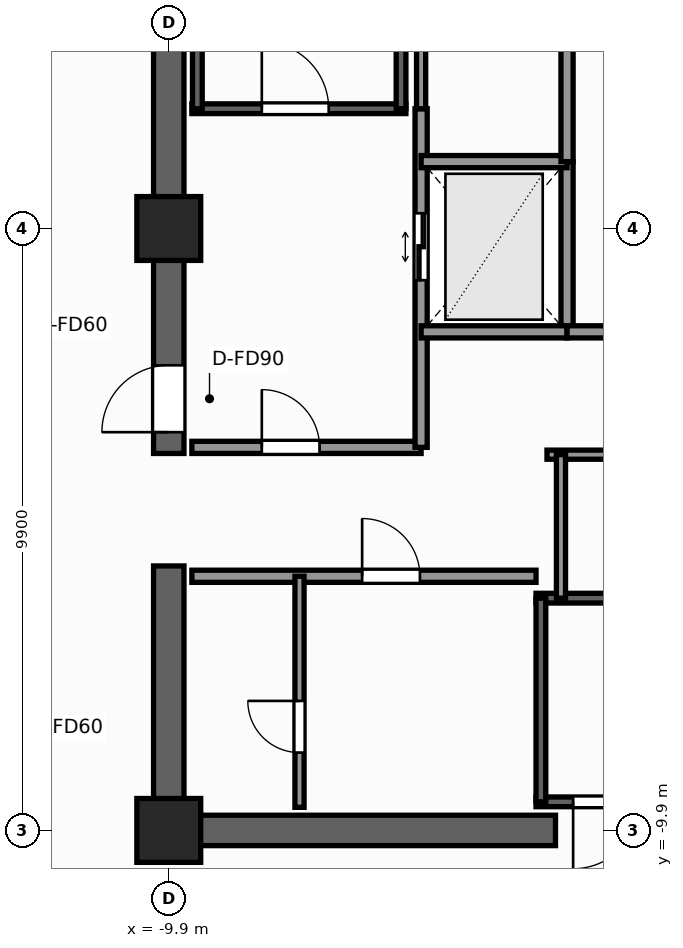
"""IFC4 building model, lengths in metres.
Left out: names, types, materials, properties, quantities, classifications, styles, units other than length and angle.
Written with IfcOpenShell. Run it as: python <this file> out.ifc"""

import sys

from ifc_helpers import new_model, si_unit, direction, frame, frame_2d, origin, origin_2d, place, context, subcontext, project, spatial, rectangle, extrude, element, fill, save


model = new_model("IFC4")
c1 = context("Model", 3, precision=1e-05, world=origin(), true_north=direction((0.0, 1.0)))
c2 = subcontext(c1, "Body", "Model", "MODEL_VIEW")
j1 = project(units=[si_unit("LENGTHUNIT", "METRE"), si_unit("PLANEANGLEUNIT", "RADIAN")], contexts=[c1])
p1 = place(None, origin())
s1 = spatial("IfcSite", under=j1, at=p1, CompositionType="ELEMENT")
p2 = place(p1, origin())
s2 = spatial("IfcBuilding", under=s1, at=p2, CompositionType="ELEMENT")
p3 = place(p2, frame((0.0, 0.0, 196.5)))
s3 = spatial("IfcBuildingStorey", under=s2, at=p3, CompositionType="ELEMENT", Elevation=196.5)
p4 = place(p3, frame((-3.54, -9.9, 0.0), z_axis=(0.0, 0.0, 1.0), x_axis=(-1.0, 0.0, 0.0)))
e1 = element("IfcWall", 1, at=p4, inside=s3, PredefinedType="SHEAR", context=c2, shape_type="SweptSolid", body=[
    extrude(rectangle(XDim=6.61, YDim=0.5, at=frame_2d((3.305, 0.0))), origin(), (0.0, 0.0, 1.0), 3.3),
])
p5 = place(p3, frame((-9.9, -9.65, 0.0), z_axis=(0.0, 0.0, 1.0), x_axis=(0.0, 1.0, 0.0)))
e2 = element("IfcWall", 2, at=p5, inside=s3, PredefinedType="SHEAR", context=c2, shape_type="SweptSolid", body=[
    extrude(rectangle(XDim=4.1, YDim=0.5, at=frame_2d((2.05, 0.0))), origin(), (0.0, 0.0, 1.0), 3.3),
])
p6 = place(p3, frame((-9.9, -3.7, 0.0), z_axis=(0.0, 0.0, 1.0), x_axis=(0.0, 1.0, 0.0)))
e3 = element("IfcWall", 3, at=p6, inside=s3, PredefinedType="SHEAR", context=c2, shape_type="SweptSolid", body=[
    extrude(rectangle(XDim=13.35, YDim=0.5, at=frame_2d((6.675, 0.0))), origin(), (0.0, 0.0, 1.0), 3.3),
])
p7 = place(p6, frame((0.35, 0.0, 0.0)))
e4 = element("IfcOpeningElement", 4, at=p7, cuts=e3, PredefinedType="OPENING", context=c2, shape_type="SweptSolid", body=[
    extrude(rectangle(XDim=1.1, YDim=2.2, at=frame_2d((0.55, 1.1))), frame((0.0, 0.26, 0.0), z_axis=(0.0, -1.0, 0.0), x_axis=(1.0, 0.0, 0.0)), (0.0, 0.0, 1.0), 0.52),
])
for number, where, z_axis, x_axis in (
    (5, (-9.9, -9.9, 0.0), (0.0, 0.0, 1.0), (1.0, 0.0, 0.0)),
    (6, (-9.9, 0.0, 0.0), (0.0, 0.0, 1.0), (1.0, 0.0, 0.0)),
):
    element("IfcColumn", number, at=place(p3, frame(where, z_axis=z_axis, x_axis=x_axis)), inside=s3, PredefinedType="COLUMN", context=c2, shape_type="SweptSolid", body=[
        extrude(rectangle(XDim=1.05, YDim=1.05, at=origin_2d()), origin(), (0.0, 0.0, 1.0), 3.3),
    ])
p8 = place(p3, frame((-9.52, 1.97, 0.0), z_axis=(0.0, 0.0, 1.0), x_axis=(1.0, 0.0, 0.0)))
e7 = element("IfcWall", 7, at=p8, inside=s3, PredefinedType="SHEAR", context=c2, shape_type="SweptSolid", body=[
    extrude(rectangle(XDim=3.52, YDim=0.16, at=frame_2d((1.76, 0.0))), origin(), (0.0, 0.0, 1.0), 3.3),
])
p9 = place(p8, frame((1.15, 0.0, 0.0)))
e8 = element("IfcOpeningElement", 8, at=p9, cuts=e7, PredefinedType="OPENING", context=c2, shape_type="SweptSolid", body=[
    extrude(rectangle(XDim=1.1, YDim=2.2, at=frame_2d((0.55, 1.1))), frame((0.0, 0.09, 0.0), z_axis=(0.0, -1.0, 0.0), x_axis=(1.0, 0.0, 0.0)), (0.0, 0.0, 1.0), 0.18),
])
for number, where, z_axis, x_axis in (
    (9, (-9.43, 1.97, 0.0), (0.0, 0.0, 1.0), (0.0, 1.0, 0.0)),
    (10, (-6.08, 1.97, 0.0), (0.0, 0.0, 1.0), (0.0, 1.0, 0.0)),
):
    element("IfcWall", number, at=place(p3, frame(where, z_axis=z_axis, x_axis=x_axis)), inside=s3, PredefinedType="SHEAR", context=c2, shape_type="SweptSolid", body=[
        extrude(rectangle(XDim=7.56, YDim=0.16, at=frame_2d((3.78, 0.0))), origin(), (0.0, 0.0, 1.0), 3.3),
    ])
p10 = place(p3, frame((3.86, -9.43, 0.0), z_axis=(0.0, 0.0, 1.0), x_axis=(-1.0, 0.0, 0.0)))
e11 = element("IfcWall", 11, at=p10, inside=s3, PredefinedType="SHEAR", context=c2, shape_type="SweptSolid", body=[
    extrude(rectangle(XDim=7.72, YDim=0.16, at=frame_2d((3.86, 0.0))), origin(), (0.0, 0.0, 1.0), 3.3),
])
p11 = place(p10, frame((6.01, 0.0, 0.0)))
e12 = element("IfcOpeningElement", 12, at=p11, cuts=e11, PredefinedType="OPENING", context=c2, shape_type="SweptSolid", body=[
    extrude(rectangle(XDim=1.1, YDim=2.2, at=frame_2d((0.55, 1.1))), frame((0.0, 0.09, 0.0), z_axis=(0.0, -1.0, 0.0), x_axis=(1.0, 0.0, 0.0)), (0.0, 0.0, 1.0), 0.18),
])
p12 = place(p3, frame((-3.86, -6.08, 0.0), z_axis=(0.0, 0.0, 1.0), x_axis=(1.0, 0.0, 0.0)))
e13 = element("IfcWall", 13, at=p12, inside=s3, PredefinedType="SHEAR", context=c2, shape_type="SweptSolid", body=[
    extrude(rectangle(XDim=7.72, YDim=0.16, at=frame_2d((3.86, 0.0))), origin(), (0.0, 0.0, 1.0), 3.3),
])
p13 = place(p3, frame((-3.78, -9.43, 0.0), z_axis=(0.0, 0.0, 1.0), x_axis=(0.0, 1.0, 0.0)))
e14 = element("IfcWall", 14, at=p13, inside=s3, PredefinedType="SHEAR", context=c2, shape_type="SweptSolid", body=[
    extrude(rectangle(XDim=3.35, YDim=0.16, at=frame_2d((1.675, 0.0))), origin(), (0.0, 0.0, 1.0), 3.3),
])
p14 = place(p3, frame((-9.52, -3.6, 0.0), z_axis=(0.0, 0.0, 1.0), x_axis=(1.0, 0.0, 0.0)))
e15 = element("IfcWall", 15, at=p14, inside=s3, PredefinedType="SOLIDWALL", context=c2, shape_type="SweptSolid", body=[
    extrude(rectangle(XDim=3.77, YDim=0.2, at=frame_2d((1.885, 0.0))), origin(), (0.0, 0.0, 1.0), 3.08),
])
p15 = place(p14, frame((1.15, 0.0, 0.0)))
e16 = element("IfcOpeningElement", 16, at=p15, cuts=e15, PredefinedType="OPENING", context=c2, shape_type="SweptSolid", body=[
    extrude(rectangle(XDim=0.95, YDim=2.06, at=frame_2d((0.475, 1.03))), frame((0.0, 0.11, 0.0), z_axis=(0.0, -1.0, 0.0), x_axis=(1.0, 0.0, 0.0)), (0.0, 0.0, 1.0), 0.22),
])
p16 = place(p3, frame((-5.75, -3.6, 0.0), z_axis=(0.0, 0.0, 1.0), x_axis=(0.0, 1.0, 0.0)))
e17 = element("IfcWall", 17, at=p16, inside=s3, PredefinedType="SOLIDWALL", context=c2, shape_type="SweptSolid", body=[
    extrude(rectangle(XDim=5.57, YDim=0.2, at=frame_2d((2.785, 0.0))), origin(), (0.0, 0.0, 1.0), 3.08),
])
p17 = place(p16, frame((2.75, 0.0, 0.0)))
e18 = element("IfcOpeningElement", 18, at=p17, cuts=e17, PredefinedType="OPENING", context=c2, shape_type="SweptSolid", body=[
    extrude(rectangle(XDim=1.1, YDim=2.2, at=frame_2d((0.55, 1.1))), frame((0.0, 0.11, 0.0), z_axis=(0.0, -1.0, 0.0), x_axis=(1.0, 0.0, 0.0)), (0.0, 0.0, 1.0), 0.22),
])
p18 = place(p3, frame((-3.35, -1.7, 0.0), z_axis=(0.0, 0.0, 1.0), x_axis=(0.0, 1.0, 0.0)))
e19 = element("IfcWall", 19, at=p18, inside=s3, PredefinedType="SOLIDWALL", context=c2, shape_type="SweptSolid", body=[
    extrude(rectangle(XDim=2.8, YDim=0.2, at=frame_2d((1.4, 0.0))), origin(), (0.0, 0.0, 1.0), 3.08),
])
for number, where, z_axis, x_axis in (
    (20, (-5.75, -1.7, 0.0), (0.0, 0.0, 1.0), (1.0, 0.0, 0.0)),
    (21, (-5.75, 1.1, 0.0), (0.0, 0.0, 1.0), (1.0, 0.0, 0.0)),
):
    element("IfcWall", number, at=place(p3, frame(where, z_axis=z_axis, x_axis=x_axis)), inside=s3, PredefinedType="SOLIDWALL", context=c2, shape_type="SweptSolid", body=[
        extrude(rectangle(XDim=2.4, YDim=0.2, at=frame_2d((1.2, 0.0))), origin(), (0.0, 0.0, 1.0), 3.08),
    ])
p19 = place(p3, frame((-9.52, -5.72, 0.0), z_axis=(0.0, 0.0, 1.0), x_axis=(1.0, 0.0, 0.0)))
e22 = element("IfcWall", 22, at=p19, inside=s3, PredefinedType="SOLIDWALL", context=c2, shape_type="SweptSolid", body=[
    extrude(rectangle(XDim=5.66, YDim=0.2, at=frame_2d((2.83, 0.0))), origin(), (0.0, 0.0, 1.0), 3.08),
])
p20 = place(p19, frame((2.8, 0.0, 0.0)))
e23 = element("IfcOpeningElement", 23, at=p20, cuts=e22, PredefinedType="OPENING", context=c2, shape_type="SweptSolid", body=[
    extrude(rectangle(XDim=0.95, YDim=2.06, at=frame_2d((0.475, 1.03))), frame((0.0, 0.11, 0.0), z_axis=(0.0, -1.0, 0.0), x_axis=(1.0, 0.0, 0.0)), (0.0, 0.0, 1.0), 0.22),
])
p21 = place(p3, frame((-7.75, -9.52, 0.0), z_axis=(0.0, 0.0, 1.0), x_axis=(0.0, 1.0, 0.0)))
e24 = element("IfcWall", 24, at=p21, inside=s3, PredefinedType="PARTITIONING", context=c2, shape_type="SweptSolid", body=[
    extrude(rectangle(XDim=3.8, YDim=0.15, at=frame_2d((1.9, 0.0))), origin(), (0.0, 0.0, 1.0), 3.08),
])
p22 = place(p21, frame((0.9, 0.0, 0.0)))
e25 = element("IfcOpeningElement", 25, at=p22, cuts=e24, PredefinedType="OPENING", context=c2, shape_type="SweptSolid", body=[
    extrude(rectangle(XDim=0.85, YDim=2.03, at=frame_2d((0.425, 1.015))), frame((0.0, 0.085, 0.0), z_axis=(0.0, -1.0, 0.0), x_axis=(1.0, 0.0, 0.0)), (0.0, 0.0, 1.0), 0.17),
])
p23 = place(p3, frame((-3.35, -1.7, 0.0), z_axis=(0.0, 0.0, 1.0), x_axis=(1.0, 0.0, 0.0)))
e26 = element("IfcWall", 26, at=p23, inside=s3, PredefinedType="SOLIDWALL", context=c2, shape_type="SweptSolid", body=[
    extrude(rectangle(XDim=6.7, YDim=0.2, at=frame_2d((3.35, 0.0))), origin(), (0.0, 0.0, 1.0), 3.08),
])
p24 = place(p3, frame((-3.35, 1.1, 0.0), z_axis=(0.0, 0.0, 1.0), x_axis=(0.0, 1.0, 0.0)))
e27 = element("IfcWall", 27, at=p24, inside=s3, PredefinedType="SOLIDWALL", context=c2, shape_type="SweptSolid", body=[
    extrude(rectangle(XDim=3.2, YDim=0.2, at=frame_2d((1.6, 0.0))), origin(), (0.0, 0.0, 1.0), 3.08),
])
p25 = place(p3, frame((-3.68, -3.72, 0.0), z_axis=(0.0, 0.0, 1.0), x_axis=(1.0, 0.0, 0.0)))
e28 = element("IfcWall", 28, at=p25, inside=s3, PredefinedType="PARTITIONING", context=c2, shape_type="SweptSolid", body=[
    extrude(rectangle(XDim=7.36, YDim=0.15, at=frame_2d((3.68, 0.0))), origin(), (0.0, 0.0, 1.0), 3.08),
])
p26 = place(p3, frame((-3.45, -6.08, 0.0), z_axis=(0.0, 0.0, 1.0), x_axis=(0.0, 1.0, 0.0)))
e29 = element("IfcWall", 29, at=p26, inside=s3, PredefinedType="PARTITIONING", context=c2, shape_type="SweptSolid", body=[
    extrude(rectangle(XDim=2.36, YDim=0.15, at=frame_2d((1.18, 0.0))), origin(), (0.0, 0.0, 1.0), 3.08),
])
p27 = place(p3, frame((-5.75, 1.97, 0.0), z_axis=(0.0, 0.0, 1.0), x_axis=(0.0, 1.0, 0.0)))
e30 = element("IfcWall", 30, at=p27, inside=s3, PredefinedType="PARTITIONING", context=c2, shape_type="SweptSolid", body=[
    extrude(rectangle(XDim=2.33, YDim=0.15, at=frame_2d((1.165, 0.0))), origin(), (0.0, 0.0, 1.0), 3.08),
])
p28 = place(p9, origin())
e31 = element("IfcDoor", 31, at=p28, inside=s3, OperationType="SINGLE_SWING_LEFT", PredefinedType="DOOR", context=c2, shape_type="SweptSolid", body=[
    extrude(rectangle(XDim=1.1, YDim=2.2, at=frame_2d((0.55, 1.1))), frame((0.0, 0.025, 0.0), z_axis=(0.0, -1.0, 0.0), x_axis=(1.0, 0.0, 0.0)), (0.0, 0.0, 1.0), 0.05),
])
fill(e8, e31)
p29 = place(p11, origin())
e32 = element("IfcDoor", 32, at=p29, inside=s3, OperationType="SINGLE_SWING_RIGHT", PredefinedType="DOOR", context=c2, shape_type="SweptSolid", body=[
    extrude(rectangle(XDim=1.1, YDim=2.2, at=frame_2d((0.55, 1.1))), frame((0.0, 0.025, 0.0), z_axis=(0.0, -1.0, 0.0), x_axis=(1.0, 0.0, 0.0)), (0.0, 0.0, 1.0), 0.05),
])
fill(e12, e32)
p30 = place(p7, origin())
e33 = element("IfcDoor", 33, at=p30, inside=s3, OperationType="SINGLE_SWING_LEFT", PredefinedType="DOOR", context=c2, shape_type="SweptSolid", body=[
    extrude(rectangle(XDim=1.1, YDim=2.2, at=frame_2d((0.55, 1.1))), frame((0.0, 0.025, 0.0), z_axis=(0.0, -1.0, 0.0), x_axis=(1.0, 0.0, 0.0)), (0.0, 0.0, 1.0), 0.05),
])
fill(e4, e33)
p31 = place(p17, origin())
e34 = element("IfcDoor", 34, at=p31, inside=s3, OperationType="DOUBLE_DOOR_SLIDING", PredefinedType="DOOR", context=c2, shape_type="SweptSolid", body=[
    extrude(rectangle(XDim=1.1, YDim=2.2, at=frame_2d((0.55, 1.1))), frame((0.0, 0.025, 0.0), z_axis=(0.0, -1.0, 0.0), x_axis=(1.0, 0.0, 0.0)), (0.0, 0.0, 1.0), 0.05),
])
fill(e18, e34)
p32 = place(p20, origin())
e35 = element("IfcDoor", 35, at=p32, inside=s3, OperationType="SINGLE_SWING_LEFT", PredefinedType="DOOR", context=c2, shape_type="SweptSolid", body=[
    extrude(rectangle(XDim=0.95, YDim=2.06, at=frame_2d((0.475, 1.03))), frame((0.0, 0.025, 0.0), z_axis=(0.0, -1.0, 0.0), x_axis=(1.0, 0.0, 0.0)), (0.0, 0.0, 1.0), 0.05),
])
fill(e23, e35)
p33 = place(p22, origin())
e36 = element("IfcDoor", 36, at=p33, inside=s3, OperationType="SINGLE_SWING_RIGHT", PredefinedType="DOOR", context=c2, shape_type="SweptSolid", body=[
    extrude(rectangle(XDim=0.85, YDim=2.03, at=frame_2d((0.425, 1.015))), frame((0.0, 0.025, 0.0), z_axis=(0.0, -1.0, 0.0), x_axis=(1.0, 0.0, 0.0)), (0.0, 0.0, 1.0), 0.05),
])
fill(e25, e36)
p34 = place(p15, origin())
e37 = element("IfcDoor", 37, at=p34, inside=s3, OperationType="SINGLE_SWING_LEFT", PredefinedType="DOOR", context=c2, shape_type="SweptSolid", body=[
    extrude(rectangle(XDim=0.95, YDim=2.06, at=frame_2d((0.475, 1.03))), frame((0.0, 0.025, 0.0), z_axis=(0.0, -1.0, 0.0), x_axis=(1.0, 0.0, 0.0)), (0.0, 0.0, 1.0), 0.05),
])
fill(e16, e37)
save(model, sys.argv[1])
